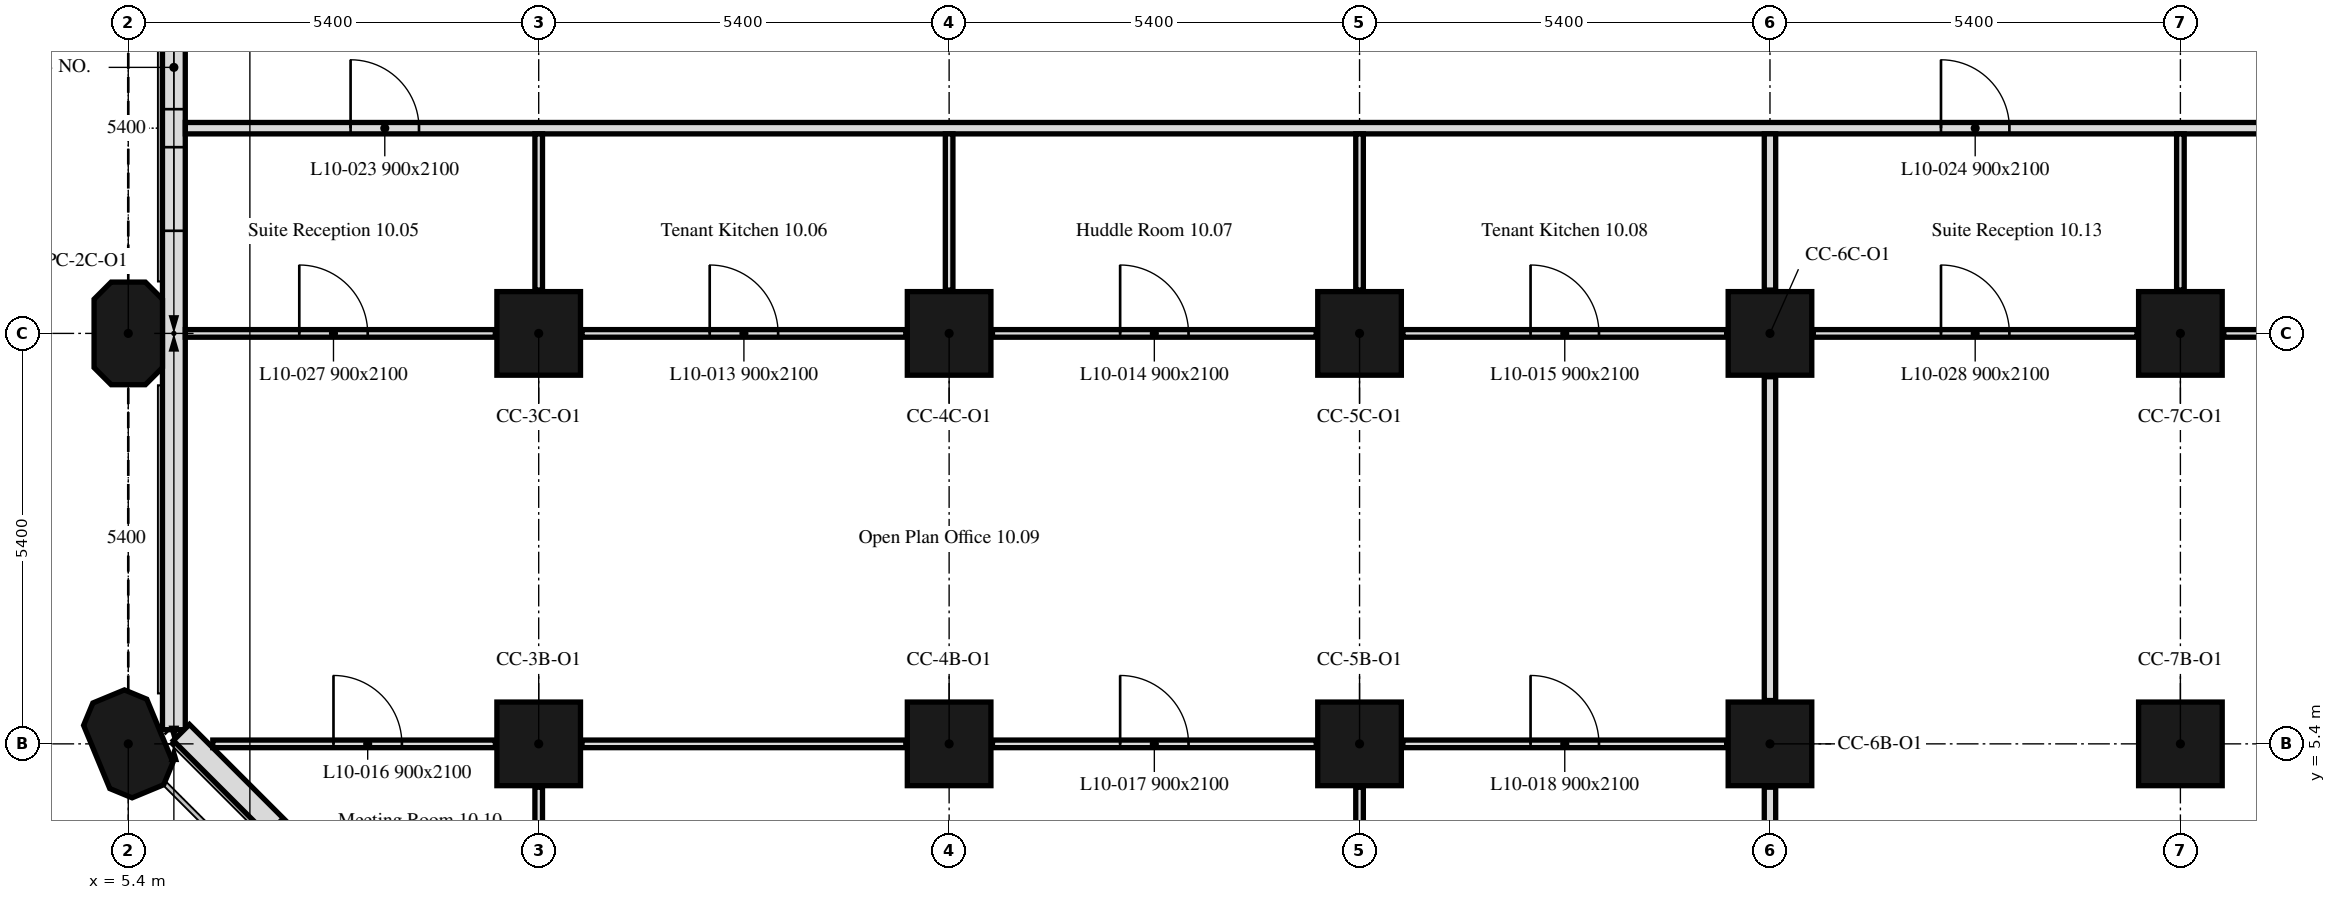
"""IFC4 building model, lengths in metres.
Left out: names, types, materials, properties, quantities, classifications, styles, units other than length and angle.
Written with IfcOpenShell. Run it as: python <this file> out.ifc"""

import sys

from ifc_helpers import new_model, si_unit, direction, frame, frame_2d, origin, origin_2d, place, context, subcontext, project, spatial, polyline, rectangle, outline, extrude, element, fill, save


model = new_model("IFC4")
c1 = context("Model", 3, precision=1e-05, world=origin(), true_north=direction((0.0, 1.0)))
c2 = subcontext(c1, "Body", "Model", "MODEL_VIEW")
j1 = project(units=[si_unit("LENGTHUNIT", "METRE"), si_unit("PLANEANGLEUNIT", "RADIAN")], contexts=[c1])
p1 = place(None, origin())
s1 = spatial("IfcSite", under=j1, at=p1, CompositionType="ELEMENT")
p2 = place(p1, origin())
s2 = spatial("IfcBuilding", under=s1, at=p2, CompositionType="ELEMENT")
p3 = place(p2, frame((0.0, 0.0, 48.8)))
s3 = spatial("IfcBuildingStorey", under=s2, at=p3, CompositionType="ELEMENT", Elevation=48.8)
p4 = place(p3, frame((5.4, 5.4, 0.0), z_axis=(0.0, 0.0, 1.0), x_axis=(-0.382683432365, 0.923879532511, 0.0)))
e1 = element("IfcColumn", 1, at=p4, inside=s3, PredefinedType="COLUMN", context=c2, shape_type="SweptSolid", body=[
    extrude(outline(polyline([(-0.45, -0.45), (0.45, -0.45), (0.675, -0.225), (0.675, 0.225), (0.45, 0.45), (-0.45, 0.45), (-0.675, 0.225), (-0.675, -0.225), (-0.45, -0.45)])), origin(), (0.0, 0.0, 1.0), 3.5),
])
for number, where, z_axis, x_axis in (
    (2, (10.8, 5.4, 0.0), (0.0, 0.0, 1.0), (1.0, 0.0, 0.0)),
    (3, (16.2, 5.4, 0.0), (0.0, 0.0, 1.0), (1.0, 0.0, 0.0)),
    (4, (21.6, 5.4, 0.0), (0.0, 0.0, 1.0), (1.0, 0.0, 0.0)),
    (5, (27.0, 5.4, 0.0), (0.0, 0.0, 1.0), (1.0, 0.0, 0.0)),
    (6, (32.4, 5.4, 0.0), (0.0, 0.0, 1.0), (1.0, 0.0, 0.0)),
):
    element("IfcColumn", number, at=place(p3, frame(where, z_axis=z_axis, x_axis=x_axis)), inside=s3, PredefinedType="COLUMN", context=c2, shape_type="SweptSolid", body=[
        extrude(rectangle(XDim=1.1, YDim=1.1, at=origin_2d()), origin(), (0.0, 0.0, 1.0), 3.5),
    ])
p5 = place(p3, frame((5.4, 10.8, 0.0), z_axis=(0.0, 0.0, 1.0), x_axis=(0.0, 1.0, 0.0)))
e7 = element("IfcColumn", 7, at=p5, inside=s3, PredefinedType="COLUMN", context=c2, shape_type="SweptSolid", body=[
    extrude(outline(polyline([(-0.45, -0.45), (0.45, -0.45), (0.675, -0.225), (0.675, 0.225), (0.45, 0.45), (-0.45, 0.45), (-0.675, 0.225), (-0.675, -0.225), (-0.45, -0.45)])), origin(), (0.0, 0.0, 1.0), 3.5),
])
for number, where, z_axis, x_axis in (
    (8, (10.8, 10.8, 0.0), (0.0, 0.0, 1.0), (1.0, 0.0, 0.0)),
    (9, (16.2, 10.8, 0.0), (0.0, 0.0, 1.0), (1.0, 0.0, 0.0)),
    (10, (21.6, 10.8, 0.0), (0.0, 0.0, 1.0), (1.0, 0.0, 0.0)),
    (11, (27.0, 10.8, 0.0), (0.0, 0.0, 1.0), (1.0, 0.0, 0.0)),
    (12, (32.4, 10.8, 0.0), (0.0, 0.0, 1.0), (1.0, 0.0, 0.0)),
):
    element("IfcColumn", number, at=place(p3, frame(where, z_axis=z_axis, x_axis=x_axis)), inside=s3, PredefinedType="COLUMN", context=c2, shape_type="SweptSolid", body=[
        extrude(rectangle(XDim=1.1, YDim=1.1, at=origin_2d()), origin(), (0.0, 0.0, 1.0), 3.5),
    ])
p6 = place(p3, frame((6.0, 16.2, 0.0), z_axis=(0.0, 0.0, 1.0), x_axis=(0.0, -1.0, 0.0)))
e13 = element("IfcWall", 13, at=p6, inside=s3, PredefinedType="SOLIDWALL", context=c2, shape_type="SweptSolid", body=[
    extrude(rectangle(XDim=10.614, YDim=0.3, at=frame_2d((5.307, 0.0))), origin(), (0.0, 0.0, 1.0), 3.5),
])
p7 = place(p6, frame((1.35, 0.0, 0.9)))
e14 = element("IfcOpeningElement", 14, at=p7, cuts=e13, PredefinedType="OPENING", context=c2, shape_type="SweptSolid", body=[
    extrude(rectangle(XDim=1.1, YDim=1.7, at=frame_2d((0.55, 0.85))), frame((0.0, 0.16, 0.0), z_axis=(0.0, -1.0, 0.0), x_axis=(1.0, 0.0, 0.0)), (0.0, 0.0, 1.0), 0.32),
])
p8 = place(p6, frame((2.95, 0.0, 0.9)))
e15 = element("IfcOpeningElement", 15, at=p8, cuts=e13, PredefinedType="OPENING", context=c2, shape_type="SweptSolid", body=[
    extrude(rectangle(XDim=1.1, YDim=1.7, at=frame_2d((0.55, 0.85))), frame((0.0, 0.16, 0.0), z_axis=(0.0, -1.0, 0.0), x_axis=(1.0, 0.0, 0.0)), (0.0, 0.0, 1.0), 0.32),
])
p9 = place(p3, frame((6.099, 5.55, 0.0), z_axis=(0.0, 0.0, 1.0), x_axis=(0.707106781187, -0.707106781187, 0.0)))
e16 = element("IfcWall", 16, at=p9, inside=s3, PredefinedType="SOLIDWALL", context=c2, shape_type="SweptSolid", body=[
    extrude(rectangle(XDim=6.86, YDim=0.3, at=frame_2d((3.43, 0.0))), origin(), (0.0, 0.0, 1.0), 3.5),
])
p10 = place(p9, frame((1.73, 0.0, 0.9)))
e17 = element("IfcOpeningElement", 17, at=p10, cuts=e16, PredefinedType="OPENING", context=c2, shape_type="SweptSolid", body=[
    extrude(rectangle(XDim=3.4, YDim=1.7, at=frame_2d((1.7, 0.85))), frame((0.0, 0.16, 0.0), z_axis=(0.0, -1.0, 0.0), x_axis=(1.0, 0.0, 0.0)), (0.0, 0.0, 1.0), 0.32),
])
p11 = place(p3, frame((6.151, 13.5, 0.0), z_axis=(0.0, 0.0, 1.0), x_axis=(1.0, 0.0, 0.0)))
e18 = element("IfcWall", 18, at=p11, inside=s3, PredefinedType="PARTITIONING", context=c2, shape_type="SweptSolid", body=[
    extrude(rectangle(XDim=41.698, YDim=0.15, at=frame_2d((20.849, 0.0))), origin(), (0.0, 0.0, 1.0), 2.75),
])
p12 = place(p11, frame((2.174, 0.0, 0.0)))
e19 = element("IfcOpeningElement", 19, at=p12, cuts=e18, PredefinedType="OPENING", context=c2, shape_type="SweptSolid", body=[
    extrude(rectangle(XDim=0.9, YDim=2.1, at=frame_2d((0.45, 1.05))), frame((0.0, 0.075, 0.0), z_axis=(0.0, -1.0, 0.0), x_axis=(1.0, 0.0, 0.0)), (0.0, 0.0, 1.0), 0.15),
])
p13 = place(p11, frame((23.099, 0.0, 0.0)))
e20 = element("IfcOpeningElement", 20, at=p13, cuts=e18, PredefinedType="OPENING", context=c2, shape_type="SweptSolid", body=[
    extrude(rectangle(XDim=0.9, YDim=2.1, at=frame_2d((0.45, 1.05))), frame((0.0, 0.075, 0.0), z_axis=(0.0, -1.0, 0.0), x_axis=(1.0, 0.0, 0.0)), (0.0, 0.0, 1.0), 0.15),
])
p14 = place(p3, frame((6.151, 10.8, 0.0), z_axis=(0.0, 0.0, 1.0), x_axis=(1.0, 0.0, 0.0)))
e21 = element("IfcWall", 21, at=p14, inside=s3, PredefinedType="PARTITIONING", context=c2, shape_type="SweptSolid", body=[
    extrude(rectangle(XDim=4.079, YDim=0.1, at=frame_2d((2.04, 0.0))), origin(), (0.0, 0.0, 1.0), 3.5),
])
p15 = place(p14, frame((1.499, 0.0, 0.0)))
e22 = element("IfcOpeningElement", 22, at=p15, cuts=e21, PredefinedType="OPENING", context=c2, shape_type="SweptSolid", body=[
    extrude(rectangle(XDim=0.9, YDim=2.1, at=frame_2d((0.45, 1.05))), frame((0.0, 0.05, 0.0), z_axis=(0.0, -1.0, 0.0), x_axis=(1.0, 0.0, 0.0)), (0.0, 0.0, 1.0), 0.1),
])
p16 = place(p3, frame((10.8, 11.37, 0.0), z_axis=(0.0, 0.0, 1.0), x_axis=(0.0, 1.0, 0.0)))
e23 = element("IfcWall", 23, at=p16, inside=s3, PredefinedType="PARTITIONING", context=c2, shape_type="SweptSolid", body=[
    extrude(rectangle(XDim=2.055, YDim=0.1, at=frame_2d((1.027, 0.0))), origin(), (0.0, 0.0, 1.0), 3.5),
])
p17 = place(p3, frame((11.37, 10.8, 0.0), z_axis=(0.0, 0.0, 1.0), x_axis=(1.0, 0.0, 0.0)))
e24 = element("IfcWall", 24, at=p17, inside=s3, PredefinedType="PARTITIONING", context=c2, shape_type="SweptSolid", body=[
    extrude(rectangle(XDim=4.26, YDim=0.1, at=frame_2d((2.13, 0.0))), origin(), (0.0, 0.0, 1.0), 3.5),
])
p18 = place(p17, frame((1.68, 0.0, 0.0)))
e25 = element("IfcOpeningElement", 25, at=p18, cuts=e24, PredefinedType="OPENING", context=c2, shape_type="SweptSolid", body=[
    extrude(rectangle(XDim=0.9, YDim=2.1, at=frame_2d((0.45, 1.05))), frame((0.0, 0.05, 0.0), z_axis=(0.0, -1.0, 0.0), x_axis=(1.0, 0.0, 0.0)), (0.0, 0.0, 1.0), 0.1),
])
p19 = place(p3, frame((16.2, 11.37, 0.0), z_axis=(0.0, 0.0, 1.0), x_axis=(0.0, 1.0, 0.0)))
e26 = element("IfcWall", 26, at=p19, inside=s3, PredefinedType="PARTITIONING", context=c2, shape_type="SweptSolid", body=[
    extrude(rectangle(XDim=2.055, YDim=0.1, at=frame_2d((1.027, 0.0))), origin(), (0.0, 0.0, 1.0), 2.75),
])
p20 = place(p3, frame((16.77, 10.8, 0.0), z_axis=(0.0, 0.0, 1.0), x_axis=(1.0, 0.0, 0.0)))
e27 = element("IfcWall", 27, at=p20, inside=s3, PredefinedType="PARTITIONING", context=c2, shape_type="SweptSolid", body=[
    extrude(rectangle(XDim=4.26, YDim=0.1, at=frame_2d((2.13, 0.0))), origin(), (0.0, 0.0, 1.0), 3.5),
])
p21 = place(p20, frame((1.68, 0.0, 0.0)))
e28 = element("IfcOpeningElement", 28, at=p21, cuts=e27, PredefinedType="OPENING", context=c2, shape_type="SweptSolid", body=[
    extrude(rectangle(XDim=0.9, YDim=2.1, at=frame_2d((0.45, 1.05))), frame((0.0, 0.05, 0.0), z_axis=(0.0, -1.0, 0.0), x_axis=(1.0, 0.0, 0.0)), (0.0, 0.0, 1.0), 0.1),
])
p22 = place(p3, frame((21.6, 11.37, 0.0), z_axis=(0.0, 0.0, 1.0), x_axis=(0.0, 1.0, 0.0)))
e29 = element("IfcWall", 29, at=p22, inside=s3, PredefinedType="PARTITIONING", context=c2, shape_type="SweptSolid", body=[
    extrude(rectangle(XDim=2.055, YDim=0.1, at=frame_2d((1.027, 0.0))), origin(), (0.0, 0.0, 1.0), 2.75),
])
p23 = place(p3, frame((22.17, 10.8, 0.0), z_axis=(0.0, 0.0, 1.0), x_axis=(1.0, 0.0, 0.0)))
e30 = element("IfcWall", 30, at=p23, inside=s3, PredefinedType="PARTITIONING", context=c2, shape_type="SweptSolid", body=[
    extrude(rectangle(XDim=4.26, YDim=0.1, at=frame_2d((2.13, 0.0))), origin(), (0.0, 0.0, 1.0), 3.5),
])
p24 = place(p23, frame((1.68, 0.0, 0.0)))
e31 = element("IfcOpeningElement", 31, at=p24, cuts=e30, PredefinedType="OPENING", context=c2, shape_type="SweptSolid", body=[
    extrude(rectangle(XDim=0.9, YDim=2.1, at=frame_2d((0.45, 1.05))), frame((0.0, 0.05, 0.0), z_axis=(0.0, -1.0, 0.0), x_axis=(1.0, 0.0, 0.0)), (0.0, 0.0, 1.0), 0.1),
])
p25 = place(p3, frame((27.0, 11.37, 0.0), z_axis=(0.0, 0.0, 1.0), x_axis=(0.0, 1.0, 0.0)))
e32 = element("IfcWall", 32, at=p25, inside=s3, PredefinedType="PARTITIONING", context=c2, shape_type="SweptSolid", body=[
    extrude(rectangle(XDim=2.055, YDim=0.15, at=frame_2d((1.027, 0.0))), origin(), (0.0, 0.0, 1.0), 2.75),
])
p26 = place(p3, frame((6.512, 5.4, 0.0), z_axis=(0.0, 0.0, 1.0), x_axis=(1.0, 0.0, 0.0)))
e33 = element("IfcWall", 33, at=p26, inside=s3, PredefinedType="PARTITIONING", context=c2, shape_type="SweptSolid", body=[
    extrude(rectangle(XDim=3.718, YDim=0.1, at=frame_2d((1.859, 0.0))), origin(), (0.0, 0.0, 1.0), 3.5),
])
p27 = place(p26, frame((1.588, 0.0, 0.0)))
e34 = element("IfcOpeningElement", 34, at=p27, cuts=e33, PredefinedType="OPENING", context=c2, shape_type="SweptSolid", body=[
    extrude(rectangle(XDim=0.9, YDim=2.1, at=frame_2d((0.45, 1.05))), frame((0.0, 0.05, 0.0), z_axis=(0.0, -1.0, 0.0), x_axis=(1.0, 0.0, 0.0)), (0.0, 0.0, 1.0), 0.1),
])
p28 = place(p3, frame((11.37, 5.4, 0.0), z_axis=(0.0, 0.0, 1.0), x_axis=(1.0, 0.0, 0.0)))
e35 = element("IfcWall", 35, at=p28, inside=s3, PredefinedType="PARTITIONING", context=c2, shape_type="SweptSolid", body=[
    extrude(rectangle(XDim=4.26, YDim=0.1, at=frame_2d((2.13, 0.0))), origin(), (0.0, 0.0, 1.0), 3.5),
])
p29 = place(p3, frame((16.77, 5.4, 0.0), z_axis=(0.0, 0.0, 1.0), x_axis=(1.0, 0.0, 0.0)))
e36 = element("IfcWall", 36, at=p29, inside=s3, PredefinedType="PARTITIONING", context=c2, shape_type="SweptSolid", body=[
    extrude(rectangle(XDim=4.26, YDim=0.1, at=frame_2d((2.13, 0.0))), origin(), (0.0, 0.0, 1.0), 3.5),
])
p30 = place(p29, frame((1.68, 0.0, 0.0)))
e37 = element("IfcOpeningElement", 37, at=p30, cuts=e36, PredefinedType="OPENING", context=c2, shape_type="SweptSolid", body=[
    extrude(rectangle(XDim=0.9, YDim=2.1, at=frame_2d((0.45, 1.05))), frame((0.0, 0.05, 0.0), z_axis=(0.0, -1.0, 0.0), x_axis=(1.0, 0.0, 0.0)), (0.0, 0.0, 1.0), 0.1),
])
p31 = place(p3, frame((22.17, 5.4, 0.0), z_axis=(0.0, 0.0, 1.0), x_axis=(1.0, 0.0, 0.0)))
e38 = element("IfcWall", 38, at=p31, inside=s3, PredefinedType="PARTITIONING", context=c2, shape_type="SweptSolid", body=[
    extrude(rectangle(XDim=4.26, YDim=0.1, at=frame_2d((2.13, 0.0))), origin(), (0.0, 0.0, 1.0), 3.5),
])
p32 = place(p31, frame((1.68, 0.0, 0.0)))
e39 = element("IfcOpeningElement", 39, at=p32, cuts=e38, PredefinedType="OPENING", context=c2, shape_type="SweptSolid", body=[
    extrude(rectangle(XDim=0.9, YDim=2.1, at=frame_2d((0.45, 1.05))), frame((0.0, 0.05, 0.0), z_axis=(0.0, -1.0, 0.0), x_axis=(1.0, 0.0, 0.0)), (0.0, 0.0, 1.0), 0.1),
])
p33 = place(p3, frame((27.0, 5.97, 0.0), z_axis=(0.0, 0.0, 1.0), x_axis=(0.0, 1.0, 0.0)))
e40 = element("IfcWall", 40, at=p33, inside=s3, PredefinedType="PARTITIONING", context=c2, shape_type="SweptSolid", body=[
    extrude(rectangle(XDim=4.26, YDim=0.15, at=frame_2d((2.13, 0.0))), origin(), (0.0, 0.0, 1.0), 2.75),
])
p34 = place(p3, frame((10.8, 1.112, 0.0), z_axis=(0.0, 0.0, 1.0), x_axis=(0.0, 1.0, 0.0)))
e41 = element("IfcWall", 41, at=p34, inside=s3, PredefinedType="PARTITIONING", context=c2, shape_type="SweptSolid", body=[
    extrude(rectangle(XDim=3.718, YDim=0.1, at=frame_2d((1.859, 0.0))), origin(), (0.0, 0.0, 1.0), 3.5),
])
p35 = place(p3, frame((21.6, 0.751, 0.0), z_axis=(0.0, 0.0, 1.0), x_axis=(0.0, 1.0, 0.0)))
e42 = element("IfcWall", 42, at=p35, inside=s3, PredefinedType="PARTITIONING", context=c2, shape_type="SweptSolid", body=[
    extrude(rectangle(XDim=4.079, YDim=0.1, at=frame_2d((2.04, 0.0))), origin(), (0.0, 0.0, 1.0), 2.75),
])
p36 = place(p3, frame((27.0, 0.751, 0.0), z_axis=(0.0, 0.0, 1.0), x_axis=(0.0, 1.0, 0.0)))
e43 = element("IfcWall", 43, at=p36, inside=s3, PredefinedType="PARTITIONING", context=c2, shape_type="SweptSolid", body=[
    extrude(rectangle(XDim=4.079, YDim=0.15, at=frame_2d((2.04, 0.0))), origin(), (0.0, 0.0, 1.0), 2.75),
])
p37 = place(p3, frame((27.57, 10.8, 0.0), z_axis=(0.0, 0.0, 1.0), x_axis=(1.0, 0.0, 0.0)))
e44 = element("IfcWall", 44, at=p37, inside=s3, PredefinedType="PARTITIONING", context=c2, shape_type="SweptSolid", body=[
    extrude(rectangle(XDim=4.26, YDim=0.1, at=frame_2d((2.13, 0.0))), origin(), (0.0, 0.0, 1.0), 3.5),
])
p38 = place(p37, frame((1.68, 0.0, 0.0)))
e45 = element("IfcOpeningElement", 45, at=p38, cuts=e44, PredefinedType="OPENING", context=c2, shape_type="SweptSolid", body=[
    extrude(rectangle(XDim=0.9, YDim=2.1, at=frame_2d((0.45, 1.05))), frame((0.0, 0.05, 0.0), z_axis=(0.0, -1.0, 0.0), x_axis=(1.0, 0.0, 0.0)), (0.0, 0.0, 1.0), 0.1),
])
p39 = place(p3, frame((32.4, 11.37, 0.0), z_axis=(0.0, 0.0, 1.0), x_axis=(0.0, 1.0, 0.0)))
e46 = element("IfcWall", 46, at=p39, inside=s3, PredefinedType="PARTITIONING", context=c2, shape_type="SweptSolid", body=[
    extrude(rectangle(XDim=2.055, YDim=0.1, at=frame_2d((1.027, 0.0))), origin(), (0.0, 0.0, 1.0), 2.75),
])
p40 = place(p3, frame((32.97, 10.8, 0.0), z_axis=(0.0, 0.0, 1.0), x_axis=(1.0, 0.0, 0.0)))
e47 = element("IfcWall", 47, at=p40, inside=s3, PredefinedType="PARTITIONING", context=c2, shape_type="SweptSolid", body=[
    extrude(rectangle(XDim=4.26, YDim=0.1, at=frame_2d((2.13, 0.0))), origin(), (0.0, 0.0, 1.0), 2.75),
])
p41 = place(p40, frame((1.68, 0.0, 0.0)))
e48 = element("IfcOpeningElement", 48, at=p41, cuts=e47, PredefinedType="OPENING", context=c2, shape_type="SweptSolid", body=[
    extrude(rectangle(XDim=0.9, YDim=2.1, at=frame_2d((0.45, 1.05))), frame((0.0, 0.05, 0.0), z_axis=(0.0, -1.0, 0.0), x_axis=(1.0, 0.0, 0.0)), (0.0, 0.0, 1.0), 0.1),
])
p42 = place(p7, origin())
e49 = element("IfcWindow", 49, at=p42, inside=s3, PartitioningType="SINGLE_PANEL", PredefinedType="WINDOW", context=c2, shape_type="SweptSolid", body=[
    extrude(rectangle(XDim=1.1, YDim=1.7, at=frame_2d((0.55, 0.85))), frame((0.0, 0.03, 0.0), z_axis=(0.0, -1.0, 0.0), x_axis=(1.0, 0.0, 0.0)), (0.0, 0.0, 1.0), 0.06),
])
fill(e14, e49)
p43 = place(p8, origin())
e50 = element("IfcWindow", 50, at=p43, inside=s3, PartitioningType="SINGLE_PANEL", PredefinedType="WINDOW", context=c2, shape_type="SweptSolid", body=[
    extrude(rectangle(XDim=1.1, YDim=1.7, at=frame_2d((0.55, 0.85))), frame((0.0, 0.03, 0.0), z_axis=(0.0, -1.0, 0.0), x_axis=(1.0, 0.0, 0.0)), (0.0, 0.0, 1.0), 0.06),
])
fill(e15, e50)
p44 = place(p18, origin())
e51 = element("IfcDoor", 51, at=p44, inside=s3, OperationType="SINGLE_SWING_RIGHT", PredefinedType="DOOR", context=c2, shape_type="SweptSolid", body=[
    extrude(rectangle(XDim=0.9, YDim=2.1, at=frame_2d((0.45, 1.05))), frame((0.0, 0.025, 0.0), z_axis=(0.0, -1.0, 0.0), x_axis=(1.0, 0.0, 0.0)), (0.0, 0.0, 1.0), 0.05),
])
fill(e25, e51)
p45 = place(p21, origin())
e52 = element("IfcDoor", 52, at=p45, inside=s3, OperationType="SINGLE_SWING_RIGHT", PredefinedType="DOOR", context=c2, shape_type="SweptSolid", body=[
    extrude(rectangle(XDim=0.9, YDim=2.1, at=frame_2d((0.45, 1.05))), frame((0.0, 0.025, 0.0), z_axis=(0.0, -1.0, 0.0), x_axis=(1.0, 0.0, 0.0)), (0.0, 0.0, 1.0), 0.05),
])
fill(e28, e52)
p46 = place(p24, origin())
e53 = element("IfcDoor", 53, at=p46, inside=s3, OperationType="SINGLE_SWING_LEFT", PredefinedType="DOOR", context=c2, shape_type="SweptSolid", body=[
    extrude(rectangle(XDim=0.9, YDim=2.1, at=frame_2d((0.45, 1.05))), frame((0.0, 0.025, 0.0), z_axis=(0.0, -1.0, 0.0), x_axis=(1.0, 0.0, 0.0)), (0.0, 0.0, 1.0), 0.05),
])
fill(e31, e53)
p47 = place(p27, origin())
e54 = element("IfcDoor", 54, at=p47, inside=s3, OperationType="SINGLE_SWING_RIGHT", PredefinedType="DOOR", context=c2, shape_type="SweptSolid", body=[
    extrude(rectangle(XDim=0.9, YDim=2.1, at=frame_2d((0.45, 1.05))), frame((0.0, 0.025, 0.0), z_axis=(0.0, -1.0, 0.0), x_axis=(1.0, 0.0, 0.0)), (0.0, 0.0, 1.0), 0.05),
])
fill(e34, e54)
p48 = place(p30, origin())
e55 = element("IfcDoor", 55, at=p48, inside=s3, OperationType="SINGLE_SWING_RIGHT", PredefinedType="DOOR", context=c2, shape_type="SweptSolid", body=[
    extrude(rectangle(XDim=0.9, YDim=2.1, at=frame_2d((0.45, 1.05))), frame((0.0, 0.025, 0.0), z_axis=(0.0, -1.0, 0.0), x_axis=(1.0, 0.0, 0.0)), (0.0, 0.0, 1.0), 0.05),
])
fill(e37, e55)
p49 = place(p32, origin())
e56 = element("IfcDoor", 56, at=p49, inside=s3, OperationType="SINGLE_SWING_RIGHT", PredefinedType="DOOR", context=c2, shape_type="SweptSolid", body=[
    extrude(rectangle(XDim=0.9, YDim=2.1, at=frame_2d((0.45, 1.05))), frame((0.0, 0.025, 0.0), z_axis=(0.0, -1.0, 0.0), x_axis=(1.0, 0.0, 0.0)), (0.0, 0.0, 1.0), 0.05),
])
fill(e39, e56)
p50 = place(p12, origin())
e57 = element("IfcDoor", 57, at=p50, inside=s3, OperationType="SINGLE_SWING_RIGHT", PredefinedType="DOOR", context=c2, shape_type="SweptSolid", body=[
    extrude(rectangle(XDim=0.9, YDim=2.1, at=frame_2d((0.45, 1.05))), frame((0.0, 0.025, 0.0), z_axis=(0.0, -1.0, 0.0), x_axis=(1.0, 0.0, 0.0)), (0.0, 0.0, 1.0), 0.05),
])
fill(e19, e57)
p51 = place(p13, origin())
e58 = element("IfcDoor", 58, at=p51, inside=s3, OperationType="SINGLE_SWING_RIGHT", PredefinedType="DOOR", context=c2, shape_type="SweptSolid", body=[
    extrude(rectangle(XDim=0.9, YDim=2.1, at=frame_2d((0.45, 1.05))), frame((0.0, 0.025, 0.0), z_axis=(0.0, -1.0, 0.0), x_axis=(1.0, 0.0, 0.0)), (0.0, 0.0, 1.0), 0.05),
])
fill(e20, e58)
p52 = place(p15, origin())
e59 = element("IfcDoor", 59, at=p52, inside=s3, OperationType="SINGLE_SWING_LEFT", PredefinedType="DOOR", context=c2, shape_type="SweptSolid", body=[
    extrude(rectangle(XDim=0.9, YDim=2.1, at=frame_2d((0.45, 1.05))), frame((0.0, 0.025, 0.0), z_axis=(0.0, -1.0, 0.0), x_axis=(1.0, 0.0, 0.0)), (0.0, 0.0, 1.0), 0.05),
])
fill(e22, e59)
p53 = place(p38, origin())
e60 = element("IfcDoor", 60, at=p53, inside=s3, OperationType="SINGLE_SWING_LEFT", PredefinedType="DOOR", context=c2, shape_type="SweptSolid", body=[
    extrude(rectangle(XDim=0.9, YDim=2.1, at=frame_2d((0.45, 1.05))), frame((0.0, 0.025, 0.0), z_axis=(0.0, -1.0, 0.0), x_axis=(1.0, 0.0, 0.0)), (0.0, 0.0, 1.0), 0.05),
])
fill(e45, e60)
save(model, sys.argv[1])
